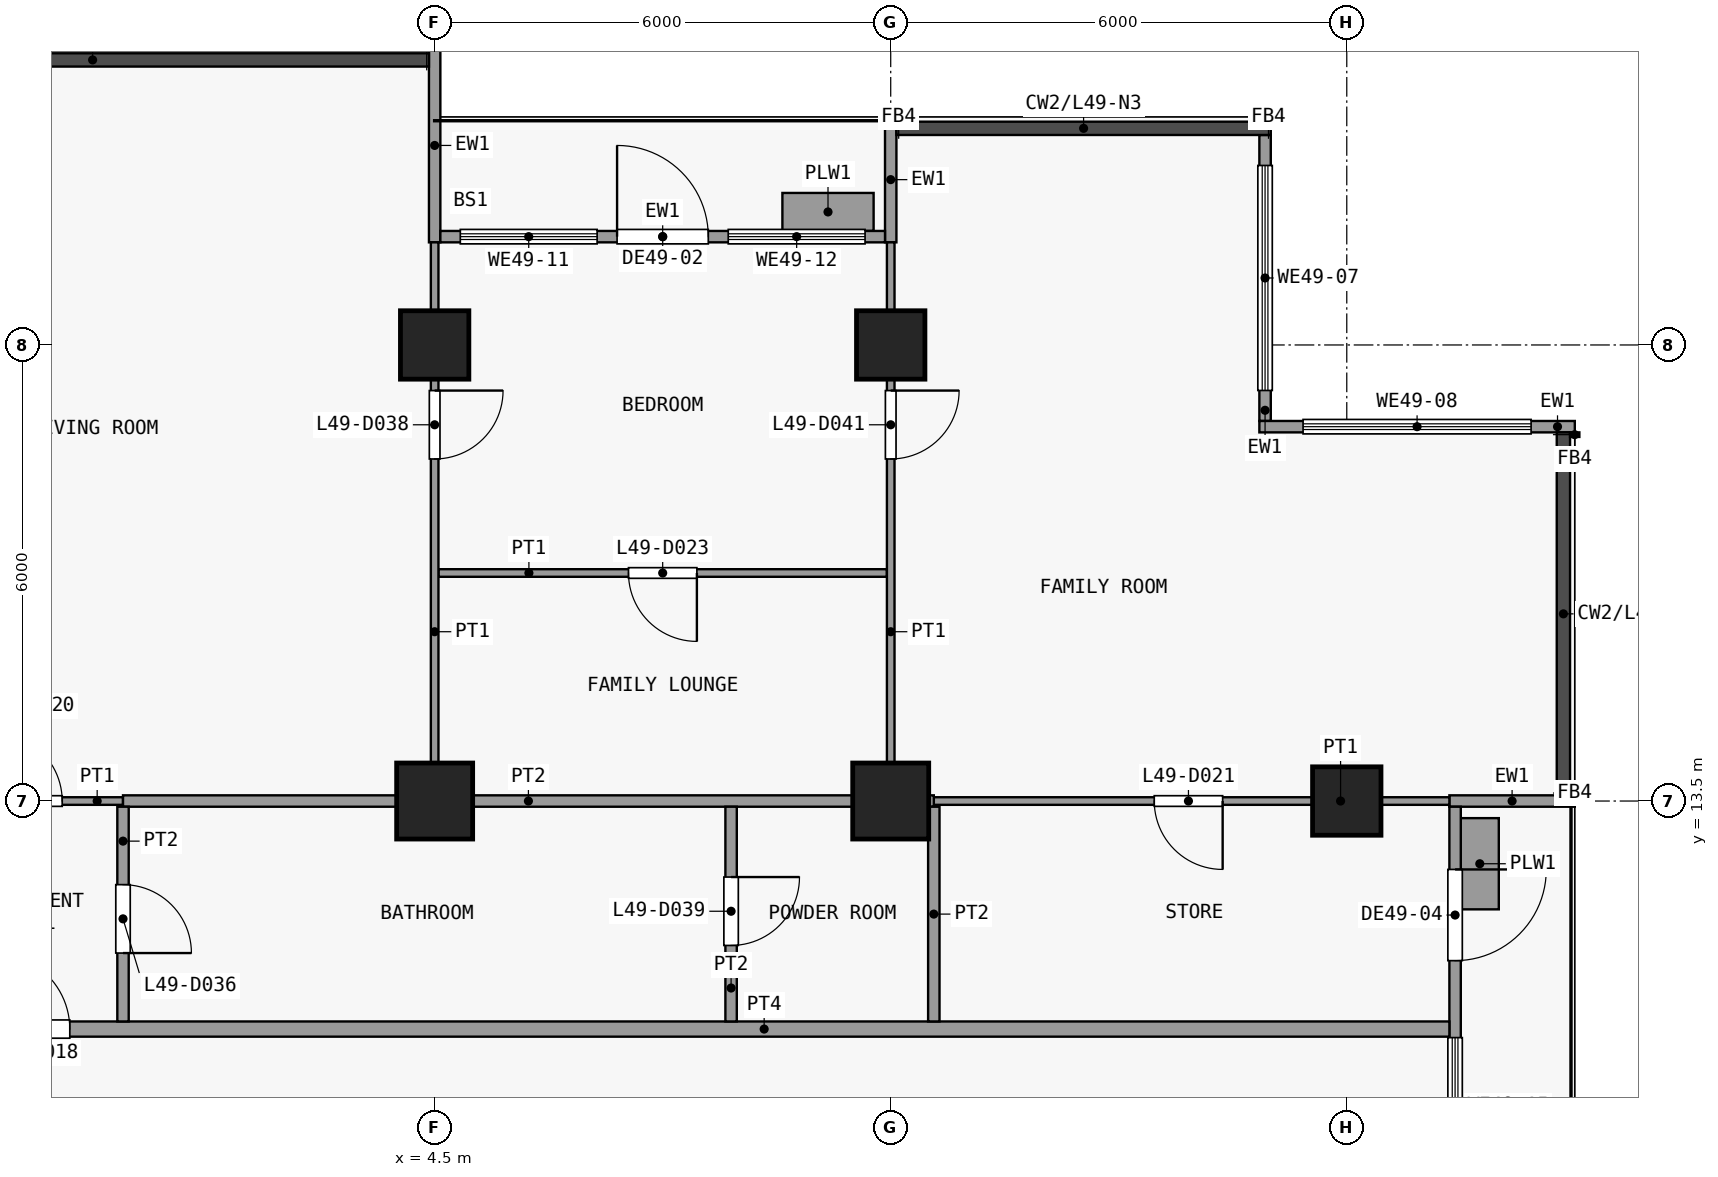
"""IFC4 building model, lengths in metres.
Left out: names, types, materials, properties, quantities, classifications, styles, units other than length and angle.
Written with IfcOpenShell. Run it as: python <this file> out.ifc"""

import sys

from ifc_helpers import new_model, si_unit, direction, frame, frame_2d, origin, origin_2d, place, context, subcontext, project, spatial, rectangle, extrude, element, fill, save


model = new_model("IFC4")
c1 = context("Model", 3, precision=1e-05, world=origin(), true_north=direction((0.0, 1.0)))
c2 = subcontext(c1, "Body", "Model", "MODEL_VIEW")
j1 = project(units=[si_unit("LENGTHUNIT", "METRE"), si_unit("PLANEANGLEUNIT", "RADIAN")], contexts=[c1])
p1 = place(None, origin())
s1 = spatial("IfcSite", under=j1, at=p1, CompositionType="ELEMENT")
p2 = place(p1, origin())
s2 = spatial("IfcBuilding", under=s1, at=p2, CompositionType="ELEMENT")
p3 = place(p2, frame((0.0, 0.0, 196.1)))
s3 = spatial("IfcBuildingStorey", under=s2, at=p3, CompositionType="ELEMENT", Elevation=196.1)
p4 = place(p3, frame((4.5, 13.5, 0.0), z_axis=(0.0, 0.0, 1.0), x_axis=(1.0, 0.0, 0.0)))
e1 = element("IfcColumn", 1, at=p4, inside=s3, PredefinedType="COLUMN", context=c2, shape_type="SweptSolid", body=[
    extrude(rectangle(XDim=1.0, YDim=1.0, at=origin_2d()), origin(), (0.0, 0.0, 1.0), 3.6),
])
p5 = place(p3, frame((4.5, 19.5, 0.0), z_axis=(0.0, 0.0, 1.0), x_axis=(1.0, 0.0, 0.0)))
e2 = element("IfcColumn", 2, at=p5, inside=s3, PredefinedType="COLUMN", context=c2, shape_type="SweptSolid", body=[
    extrude(rectangle(XDim=0.9, YDim=0.9, at=origin_2d()), origin(), (0.0, 0.0, 1.0), 3.6),
])
p6 = place(p3, frame((10.5, 13.5, 0.0), z_axis=(0.0, 0.0, 1.0), x_axis=(1.0, 0.0, 0.0)))
e3 = element("IfcColumn", 3, at=p6, inside=s3, PredefinedType="COLUMN", context=c2, shape_type="SweptSolid", body=[
    extrude(rectangle(XDim=1.0, YDim=1.0, at=origin_2d()), origin(), (0.0, 0.0, 1.0), 3.6),
])
for number, where, z_axis, x_axis in (
    (4, (10.5, 19.5, 0.0), (0.0, 0.0, 1.0), (1.0, 0.0, 0.0)),
    (5, (16.5, 13.5, 0.0), (0.0, 0.0, 1.0), (1.0, 0.0, 0.0)),
):
    element("IfcColumn", number, at=place(p3, frame(where, z_axis=z_axis, x_axis=x_axis)), inside=s3, PredefinedType="COLUMN", context=c2, shape_type="SweptSolid", body=[
        extrude(rectangle(XDim=0.9, YDim=0.9, at=origin_2d()), origin(), (0.0, 0.0, 1.0), 3.6),
    ])
p7 = place(p3, frame((15.425, 22.262, 0.0), z_axis=(0.0, 0.0, 1.0), x_axis=(0.0, -1.0, 0.0)))
e6 = element("IfcWall", 6, at=p7, inside=s3, PredefinedType="SOLIDWALL", context=c2, shape_type="SweptSolid", body=[
    extrude(rectangle(XDim=3.762, YDim=0.15, at=frame_2d((1.881, 0.0))), origin(), (0.0, 0.0, 1.0), 3.15),
])
p8 = place(p7, frame((0.401, 0.0, 0.9)))
e7 = element("IfcOpeningElement", 7, at=p8, cuts=e6, PredefinedType="OPENING", context=c2, shape_type="SweptSolid", body=[
    extrude(rectangle(XDim=2.96, YDim=2.4, at=frame_2d((1.48, 1.2))), frame((0.0, 0.085, 0.0), z_axis=(0.0, -1.0, 0.0), x_axis=(1.0, 0.0, 0.0)), (0.0, 0.0, 1.0), 0.17),
])
p9 = place(p3, frame((15.35, 18.425, 0.0), z_axis=(0.0, 0.0, 1.0), x_axis=(1.0, 0.0, 0.0)))
e8 = element("IfcWall", 8, at=p9, inside=s3, PredefinedType="SOLIDWALL", context=c2, shape_type="SweptSolid", body=[
    extrude(rectangle(XDim=4.15, YDim=0.15, at=frame_2d((2.075, 0.0))), origin(), (0.0, 0.0, 1.0), 3.15),
])
p10 = place(p9, frame((0.575, 0.0, 0.9)))
e9 = element("IfcOpeningElement", 9, at=p10, cuts=e8, PredefinedType="OPENING", context=c2, shape_type="SweptSolid", body=[
    extrude(rectangle(XDim=3.0, YDim=2.4, at=frame_2d((1.5, 1.2))), frame((0.0, 0.085, 0.0), z_axis=(0.0, -1.0, 0.0), x_axis=(1.0, 0.0, 0.0)), (0.0, 0.0, 1.0), 0.17),
])
p11 = place(p3, frame((4.5, 20.85, 0.0), z_axis=(0.0, 0.0, 1.0), x_axis=(0.0, 1.0, 0.0)))
e10 = element("IfcWall", 10, at=p11, inside=s3, PredefinedType="SOLIDWALL", context=c2, shape_type="SweptSolid", body=[
    extrude(rectangle(XDim=2.55, YDim=0.15, at=frame_2d((1.275, 0.0))), origin(), (0.0, 0.0, 1.0), 3.15),
])
p12 = place(p3, frame((10.5, 20.85, 0.0), z_axis=(0.0, 0.0, 1.0), x_axis=(0.0, 1.0, 0.0)))
e11 = element("IfcWall", 11, at=p12, inside=s3, PredefinedType="SOLIDWALL", context=c2, shape_type="SweptSolid", body=[
    extrude(rectangle(XDim=1.65, YDim=0.15, at=frame_2d((0.825, 0.0))), origin(), (0.0, 0.0, 1.0), 3.15),
])
p13 = place(p3, frame((4.575, 20.925, 0.0), z_axis=(0.0, 0.0, 1.0), x_axis=(1.0, 0.0, 0.0)))
e12 = element("IfcWall", 12, at=p13, inside=s3, PredefinedType="SOLIDWALL", context=c2, shape_type="SweptSolid", body=[
    extrude(rectangle(XDim=5.85, YDim=0.15, at=frame_2d((2.925, 0.0))), origin(), (0.0, 0.0, 1.0), 3.15),
])
p14 = place(p13, frame((2.325, 0.0, 0.0)))
e13 = element("IfcOpeningElement", 13, at=p14, cuts=e12, PredefinedType="OPENING", context=c2, shape_type="SweptSolid", body=[
    extrude(rectangle(XDim=1.2, YDim=2.4, at=frame_2d((0.6, 1.2))), frame((0.0, 0.085, 0.0), z_axis=(0.0, -1.0, 0.0), x_axis=(1.0, 0.0, 0.0)), (0.0, 0.0, 1.0), 0.17),
])
p15 = place(p13, frame((0.262, 0.0, 0.9)))
e14 = element("IfcOpeningElement", 14, at=p15, cuts=e12, PredefinedType="OPENING", context=c2, shape_type="SweptSolid", body=[
    extrude(rectangle(XDim=1.8, YDim=2.1, at=frame_2d((0.9, 1.05))), frame((0.0, 0.085, 0.0), z_axis=(0.0, -1.0, 0.0), x_axis=(1.0, 0.0, 0.0)), (0.0, 0.0, 1.0), 0.17),
])
p16 = place(p13, frame((3.788, 0.0, 0.9)))
e15 = element("IfcOpeningElement", 15, at=p16, cuts=e12, PredefinedType="OPENING", context=c2, shape_type="SweptSolid", body=[
    extrude(rectangle(XDim=1.8, YDim=2.1, at=frame_2d((0.9, 1.05))), frame((0.0, 0.085, 0.0), z_axis=(0.0, -1.0, 0.0), x_axis=(1.0, 0.0, 0.0)), (0.0, 0.0, 1.0), 0.17),
])
p17 = place(p3, frame((9.075, 21.25, 0.0), z_axis=(0.0, 0.0, 1.0), x_axis=(1.0, 0.0, 0.0)))
e16 = element("IfcWall", 16, at=p17, inside=s3, PredefinedType="USERDEFINED", context=c2, shape_type="SweptSolid", body=[
    extrude(rectangle(XDim=1.2, YDim=0.5, at=frame_2d((0.6, 0.0))), origin(), (0.0, 0.0, 1.0), 0.9),
])
p18 = place(p3, frame((17.85, 13.5, 0.0), z_axis=(0.0, 0.0, 1.0), x_axis=(1.0, 0.0, 0.0)))
e17 = element("IfcWall", 17, at=p18, inside=s3, PredefinedType="SOLIDWALL", context=c2, shape_type="SweptSolid", body=[
    extrude(rectangle(XDim=1.65, YDim=0.15, at=frame_2d((0.825, 0.0))), origin(), (0.0, 0.0, 1.0), 3.15),
])
p19 = place(p3, frame((17.925, 13.425, 0.0), z_axis=(0.0, 0.0, 1.0), x_axis=(0.0, -1.0, 0.0)))
e18 = element("IfcWall", 18, at=p19, inside=s3, PredefinedType="SOLIDWALL", context=c2, shape_type="SweptSolid", body=[
    extrude(rectangle(XDim=5.85, YDim=0.15, at=frame_2d((2.925, 0.0))), origin(), (0.0, 0.0, 1.0), 3.15),
])
p20 = place(p19, frame((0.825, 0.0, 0.0)))
e19 = element("IfcOpeningElement", 19, at=p20, cuts=e18, PredefinedType="OPENING", context=c2, shape_type="SweptSolid", body=[
    extrude(rectangle(XDim=1.2, YDim=2.4, at=frame_2d((0.6, 1.2))), frame((0.0, 0.085, 0.0), z_axis=(0.0, -1.0, 0.0), x_axis=(1.0, 0.0, 0.0)), (0.0, 0.0, 1.0), 0.17),
])
p21 = place(p19, frame((3.038, 0.0, 0.9)))
e20 = element("IfcOpeningElement", 20, at=p21, cuts=e18, PredefinedType="OPENING", context=c2, shape_type="SweptSolid", body=[
    extrude(rectangle(XDim=1.8, YDim=2.1, at=frame_2d((0.9, 1.05))), frame((0.0, 0.085, 0.0), z_axis=(0.0, -1.0, 0.0), x_axis=(1.0, 0.0, 0.0)), (0.0, 0.0, 1.0), 0.17),
])
p22 = place(p3, frame((18.25, 12.075, 0.0), z_axis=(0.0, 0.0, 1.0), x_axis=(0.0, 1.0, 0.0)))
e21 = element("IfcWall", 21, at=p22, inside=s3, PredefinedType="USERDEFINED", context=c2, shape_type="SweptSolid", body=[
    extrude(rectangle(XDim=1.2, YDim=0.5, at=frame_2d((0.6, 0.0))), origin(), (0.0, 0.0, 1.0), 0.9),
])
p23 = place(p3, frame((-17.85, 10.5, 0.0), z_axis=(0.0, 0.0, 1.0), x_axis=(1.0, 0.0, 0.0)))
e22 = element("IfcWall", 22, at=p23, inside=s3, PredefinedType="PARTITIONING", context=c2, shape_type="SweptSolid", body=[
    extrude(rectangle(XDim=35.7, YDim=0.2, at=frame_2d((17.85, 0.0))), origin(), (0.0, 0.0, 1.0), 3.15),
])
p24 = place(p23, frame((5.55, 0.0, 0.0)))
e23 = element("IfcOpeningElement", 23, at=p24, cuts=e22, PredefinedType="OPENING", context=c2, shape_type="SweptSolid", body=[
    extrude(rectangle(XDim=1.0, YDim=2.1, at=frame_2d((0.5, 1.05))), frame((0.0, 0.11, 0.0), z_axis=(0.0, -1.0, 0.0), x_axis=(1.0, 0.0, 0.0)), (0.0, 0.0, 1.0), 0.22),
])
p25 = place(p23, frame((16.55, 0.0, 0.0)))
e24 = element("IfcOpeningElement", 24, at=p25, cuts=e22, PredefinedType="OPENING", context=c2, shape_type="SweptSolid", body=[
    extrude(rectangle(XDim=1.0, YDim=2.1, at=frame_2d((0.5, 1.05))), frame((0.0, 0.11, 0.0), z_axis=(0.0, -1.0, 0.0), x_axis=(1.0, 0.0, 0.0)), (0.0, 0.0, 1.0), 0.22),
])
p26 = place(p3, frame((-2.0, 13.5, 0.0), z_axis=(0.0, 0.0, 1.0), x_axis=(1.0, 0.0, 0.0)))
e25 = element("IfcWall", 25, at=p26, inside=s3, PredefinedType="PARTITIONING", context=c2, shape_type="SweptSolid", body=[
    extrude(rectangle(XDim=2.4, YDim=0.1, at=frame_2d((1.2, 0.0))), origin(), (0.0, 0.0, 1.0), 3.15),
])
p27 = place(p26, frame((0.7, 0.0, 0.0)))
e26 = element("IfcOpeningElement", 26, at=p27, cuts=e25, PredefinedType="OPENING", context=c2, shape_type="SweptSolid", body=[
    extrude(rectangle(XDim=0.9, YDim=2.1, at=frame_2d((0.45, 1.05))), frame((0.0, 0.06, 0.0), z_axis=(0.0, -1.0, 0.0), x_axis=(1.0, 0.0, 0.0)), (0.0, 0.0, 1.0), 0.12),
])
p28 = place(p3, frame((11.067, 13.5, 0.0), z_axis=(0.0, 0.0, 1.0), x_axis=(1.0, 0.0, 0.0)))
e27 = element("IfcWall", 27, at=p28, inside=s3, PredefinedType="PARTITIONING", context=c2, shape_type="SweptSolid", body=[
    extrude(rectangle(XDim=6.783, YDim=0.1, at=frame_2d((3.392, 0.0))), origin(), (0.0, 0.0, 1.0), 3.15),
])
p29 = place(p28, frame((2.9, 0.0, 0.0)))
e28 = element("IfcOpeningElement", 28, at=p29, cuts=e27, PredefinedType="OPENING", context=c2, shape_type="SweptSolid", body=[
    extrude(rectangle(XDim=0.9, YDim=2.1, at=frame_2d((0.45, 1.05))), frame((0.0, 0.06, 0.0), z_axis=(0.0, -1.0, 0.0), x_axis=(1.0, 0.0, 0.0)), (0.0, 0.0, 1.0), 0.12),
])
p30 = place(p3, frame((0.4, 13.5, 0.0), z_axis=(0.0, 0.0, 1.0), x_axis=(1.0, 0.0, 0.0)))
e29 = element("IfcWall", 29, at=p30, inside=s3, PredefinedType="PARTITIONING", context=c2, shape_type="SweptSolid", body=[
    extrude(rectangle(XDim=10.667, YDim=0.15, at=frame_2d((5.333, 0.0))), origin(), (0.0, 0.0, 1.0), 3.15),
])
p31 = place(p3, frame((4.55, 16.5, 0.0), z_axis=(0.0, 0.0, 1.0), x_axis=(1.0, 0.0, 0.0)))
e30 = element("IfcWall", 30, at=p31, inside=s3, PredefinedType="PARTITIONING", context=c2, shape_type="SweptSolid", body=[
    extrude(rectangle(XDim=5.9, YDim=0.1, at=frame_2d((2.95, 0.0))), origin(), (0.0, 0.0, 1.0), 3.15),
])
p32 = place(p31, frame((2.5, 0.0, 0.0)))
e31 = element("IfcOpeningElement", 31, at=p32, cuts=e30, PredefinedType="OPENING", context=c2, shape_type="SweptSolid", body=[
    extrude(rectangle(XDim=0.9, YDim=2.1, at=frame_2d((0.45, 1.05))), frame((0.0, 0.06, 0.0), z_axis=(0.0, -1.0, 0.0), x_axis=(1.0, 0.0, 0.0)), (0.0, 0.0, 1.0), 0.12),
])
p33 = place(p3, frame((0.4, 10.6, 0.0), z_axis=(0.0, 0.0, 1.0), x_axis=(0.0, 1.0, 0.0)))
e32 = element("IfcWall", 32, at=p33, inside=s3, PredefinedType="PARTITIONING", context=c2, shape_type="SweptSolid", body=[
    extrude(rectangle(XDim=2.825, YDim=0.15, at=frame_2d((1.413, 0.0))), origin(), (0.0, 0.0, 1.0), 3.15),
])
p34 = place(p33, frame((0.9, 0.0, 0.0)))
e33 = element("IfcOpeningElement", 33, at=p34, cuts=e32, PredefinedType="OPENING", context=c2, shape_type="SweptSolid", body=[
    extrude(rectangle(XDim=0.9, YDim=2.1, at=frame_2d((0.45, 1.05))), frame((0.0, 0.085, 0.0), z_axis=(0.0, -1.0, 0.0), x_axis=(1.0, 0.0, 0.0)), (0.0, 0.0, 1.0), 0.17),
])
p35 = place(p3, frame((4.5, 13.575, 0.0), z_axis=(0.0, 0.0, 1.0), x_axis=(0.0, 1.0, 0.0)))
e34 = element("IfcWall", 34, at=p35, inside=s3, PredefinedType="PARTITIONING", context=c2, shape_type="SweptSolid", body=[
    extrude(rectangle(XDim=7.275, YDim=0.1, at=frame_2d((3.638, 0.0))), origin(), (0.0, 0.0, 1.0), 3.15),
])
p36 = place(p35, frame((4.425, 0.0, 0.0)))
e35 = element("IfcOpeningElement", 35, at=p36, cuts=e34, PredefinedType="OPENING", context=c2, shape_type="SweptSolid", body=[
    extrude(rectangle(XDim=0.9, YDim=2.1, at=frame_2d((0.45, 1.05))), frame((0.0, 0.06, 0.0), z_axis=(0.0, -1.0, 0.0), x_axis=(1.0, 0.0, 0.0)), (0.0, 0.0, 1.0), 0.12),
])
p37 = place(p3, frame((8.4, 10.6, 0.0), z_axis=(0.0, 0.0, 1.0), x_axis=(0.0, 1.0, 0.0)))
e36 = element("IfcWall", 36, at=p37, inside=s3, PredefinedType="PARTITIONING", context=c2, shape_type="SweptSolid", body=[
    extrude(rectangle(XDim=2.825, YDim=0.15, at=frame_2d((1.413, 0.0))), origin(), (0.0, 0.0, 1.0), 3.15),
])
p38 = place(p37, frame((1.0, 0.0, 0.0)))
e37 = element("IfcOpeningElement", 37, at=p38, cuts=e36, PredefinedType="OPENING", context=c2, shape_type="SweptSolid", body=[
    extrude(rectangle(XDim=0.9, YDim=2.1, at=frame_2d((0.45, 1.05))), frame((0.0, 0.085, 0.0), z_axis=(0.0, -1.0, 0.0), x_axis=(1.0, 0.0, 0.0)), (0.0, 0.0, 1.0), 0.17),
])
p39 = place(p3, frame((10.5, 13.575, 0.0), z_axis=(0.0, 0.0, 1.0), x_axis=(0.0, 1.0, 0.0)))
e38 = element("IfcWall", 38, at=p39, inside=s3, PredefinedType="PARTITIONING", context=c2, shape_type="SweptSolid", body=[
    extrude(rectangle(XDim=7.275, YDim=0.1, at=frame_2d((3.638, 0.0))), origin(), (0.0, 0.0, 1.0), 3.15),
])
p40 = place(p39, frame((4.425, 0.0, 0.0)))
e39 = element("IfcOpeningElement", 39, at=p40, cuts=e38, PredefinedType="OPENING", context=c2, shape_type="SweptSolid", body=[
    extrude(rectangle(XDim=0.9, YDim=2.1, at=frame_2d((0.45, 1.05))), frame((0.0, 0.06, 0.0), z_axis=(0.0, -1.0, 0.0), x_axis=(1.0, 0.0, 0.0)), (0.0, 0.0, 1.0), 0.12),
])
p41 = place(p3, frame((11.067, 10.6, 0.0), z_axis=(0.0, 0.0, 1.0), x_axis=(0.0, 1.0, 0.0)))
e40 = element("IfcWall", 40, at=p41, inside=s3, PredefinedType="PARTITIONING", context=c2, shape_type="SweptSolid", body=[
    extrude(rectangle(XDim=2.825, YDim=0.15, at=frame_2d((1.413, 0.0))), origin(), (0.0, 0.0, 1.0), 3.15),
])
p42 = place(p8, origin())
e41 = element("IfcWindow", 41, at=p42, inside=s3, PartitioningType="SINGLE_PANEL", PredefinedType="WINDOW", context=c2, shape_type="SweptSolid", body=[
    extrude(rectangle(XDim=2.96, YDim=2.4, at=frame_2d((1.48, 1.2))), frame((0.0, 0.03, 0.0), z_axis=(0.0, -1.0, 0.0), x_axis=(1.0, 0.0, 0.0)), (0.0, 0.0, 1.0), 0.06),
])
fill(e7, e41)
p43 = place(p10, origin())
e42 = element("IfcWindow", 42, at=p43, inside=s3, PartitioningType="SINGLE_PANEL", PredefinedType="WINDOW", context=c2, shape_type="SweptSolid", body=[
    extrude(rectangle(XDim=3.0, YDim=2.4, at=frame_2d((1.5, 1.2))), frame((0.0, 0.03, 0.0), z_axis=(0.0, -1.0, 0.0), x_axis=(1.0, 0.0, 0.0)), (0.0, 0.0, 1.0), 0.06),
])
fill(e9, e42)
p44 = place(p14, origin())
e43 = element("IfcDoor", 43, at=p44, inside=s3, OperationType="SINGLE_SWING_LEFT", PredefinedType="DOOR", context=c2, shape_type="SweptSolid", body=[
    extrude(rectangle(XDim=1.2, YDim=2.4, at=frame_2d((0.6, 1.2))), frame((0.0, 0.025, 0.0), z_axis=(0.0, -1.0, 0.0), x_axis=(1.0, 0.0, 0.0)), (0.0, 0.0, 1.0), 0.05),
])
fill(e13, e43)
p45 = place(p15, origin())
e44 = element("IfcWindow", 44, at=p45, inside=s3, PartitioningType="SINGLE_PANEL", PredefinedType="WINDOW", context=c2, shape_type="SweptSolid", body=[
    extrude(rectangle(XDim=1.8, YDim=2.1, at=frame_2d((0.9, 1.05))), frame((0.0, 0.03, 0.0), z_axis=(0.0, -1.0, 0.0), x_axis=(1.0, 0.0, 0.0)), (0.0, 0.0, 1.0), 0.06),
])
fill(e14, e44)
p46 = place(p16, origin())
e45 = element("IfcWindow", 45, at=p46, inside=s3, PartitioningType="SINGLE_PANEL", PredefinedType="WINDOW", context=c2, shape_type="SweptSolid", body=[
    extrude(rectangle(XDim=1.8, YDim=2.1, at=frame_2d((0.9, 1.05))), frame((0.0, 0.03, 0.0), z_axis=(0.0, -1.0, 0.0), x_axis=(1.0, 0.0, 0.0)), (0.0, 0.0, 1.0), 0.06),
])
fill(e15, e45)
p47 = place(p20, origin())
e46 = element("IfcDoor", 46, at=p47, inside=s3, OperationType="SINGLE_SWING_LEFT", PredefinedType="DOOR", context=c2, shape_type="SweptSolid", body=[
    extrude(rectangle(XDim=1.2, YDim=2.4, at=frame_2d((0.6, 1.2))), frame((0.0, 0.025, 0.0), z_axis=(0.0, -1.0, 0.0), x_axis=(1.0, 0.0, 0.0)), (0.0, 0.0, 1.0), 0.05),
])
fill(e19, e46)
p48 = place(p21, origin())
e47 = element("IfcWindow", 47, at=p48, inside=s3, PartitioningType="SINGLE_PANEL", PredefinedType="WINDOW", context=c2, shape_type="SweptSolid", body=[
    extrude(rectangle(XDim=1.8, YDim=2.1, at=frame_2d((0.9, 1.05))), frame((0.0, 0.03, 0.0), z_axis=(0.0, -1.0, 0.0), x_axis=(1.0, 0.0, 0.0)), (0.0, 0.0, 1.0), 0.06),
])
fill(e20, e47)
p49 = place(p25, origin())
e48 = element("IfcDoor", 48, at=p49, inside=s3, OperationType="SINGLE_SWING_RIGHT", PredefinedType="DOOR", context=c2, shape_type="SweptSolid", body=[
    extrude(rectangle(XDim=1.0, YDim=2.1, at=frame_2d((0.5, 1.05))), frame((0.0, 0.025, 0.0), z_axis=(0.0, -1.0, 0.0), x_axis=(1.0, 0.0, 0.0)), (0.0, 0.0, 1.0), 0.05),
])
fill(e24, e48)
p50 = place(p27, origin())
e49 = element("IfcDoor", 49, at=p50, inside=s3, OperationType="SINGLE_SWING_RIGHT", PredefinedType="DOOR", context=c2, shape_type="SweptSolid", body=[
    extrude(rectangle(XDim=0.9, YDim=2.1, at=frame_2d((0.45, 1.05))), frame((0.0, 0.025, 0.0), z_axis=(0.0, -1.0, 0.0), x_axis=(1.0, 0.0, 0.0)), (0.0, 0.0, 1.0), 0.05),
])
fill(e26, e49)
p51 = place(p29, origin())
e50 = element("IfcDoor", 50, at=p51, inside=s3, OperationType="SINGLE_SWING_RIGHT", PredefinedType="DOOR", context=c2, shape_type="SweptSolid", body=[
    extrude(rectangle(XDim=0.9, YDim=2.1, at=frame_2d((0.45, 1.05))), frame((0.0, 0.025, 0.0), z_axis=(0.0, -1.0, 0.0), x_axis=(1.0, 0.0, 0.0)), (0.0, 0.0, 1.0), 0.05),
])
fill(e28, e50)
p52 = place(p32, origin())
e51 = element("IfcDoor", 51, at=p52, inside=s3, OperationType="SINGLE_SWING_RIGHT", PredefinedType="DOOR", context=c2, shape_type="SweptSolid", body=[
    extrude(rectangle(XDim=0.9, YDim=2.1, at=frame_2d((0.45, 1.05))), frame((0.0, 0.025, 0.0), z_axis=(0.0, -1.0, 0.0), x_axis=(1.0, 0.0, 0.0)), (0.0, 0.0, 1.0), 0.05),
])
fill(e31, e51)
p53 = place(p34, origin())
e52 = element("IfcDoor", 52, at=p53, inside=s3, OperationType="SINGLE_SWING_LEFT", PredefinedType="DOOR", context=c2, shape_type="SweptSolid", body=[
    extrude(rectangle(XDim=0.9, YDim=2.1, at=frame_2d((0.45, 1.05))), frame((0.0, 0.025, 0.0), z_axis=(0.0, -1.0, 0.0), x_axis=(1.0, 0.0, 0.0)), (0.0, 0.0, 1.0), 0.05),
])
fill(e33, e52)
p54 = place(p36, origin())
e53 = element("IfcDoor", 53, at=p54, inside=s3, OperationType="SINGLE_SWING_RIGHT", PredefinedType="DOOR", context=c2, shape_type="SweptSolid", body=[
    extrude(rectangle(XDim=0.9, YDim=2.1, at=frame_2d((0.45, 1.05))), frame((0.0, 0.025, 0.0), z_axis=(0.0, -1.0, 0.0), x_axis=(1.0, 0.0, 0.0)), (0.0, 0.0, 1.0), 0.05),
])
fill(e35, e53)
p55 = place(p38, origin())
e54 = element("IfcDoor", 54, at=p55, inside=s3, OperationType="SINGLE_SWING_RIGHT", PredefinedType="DOOR", context=c2, shape_type="SweptSolid", body=[
    extrude(rectangle(XDim=0.9, YDim=2.1, at=frame_2d((0.45, 1.05))), frame((0.0, 0.025, 0.0), z_axis=(0.0, -1.0, 0.0), x_axis=(1.0, 0.0, 0.0)), (0.0, 0.0, 1.0), 0.05),
])
fill(e37, e54)
p56 = place(p40, origin())
e55 = element("IfcDoor", 55, at=p56, inside=s3, OperationType="SINGLE_SWING_RIGHT", PredefinedType="DOOR", context=c2, shape_type="SweptSolid", body=[
    extrude(rectangle(XDim=0.9, YDim=2.1, at=frame_2d((0.45, 1.05))), frame((0.0, 0.025, 0.0), z_axis=(0.0, -1.0, 0.0), x_axis=(1.0, 0.0, 0.0)), (0.0, 0.0, 1.0), 0.05),
])
fill(e39, e55)
save(model, sys.argv[1])
